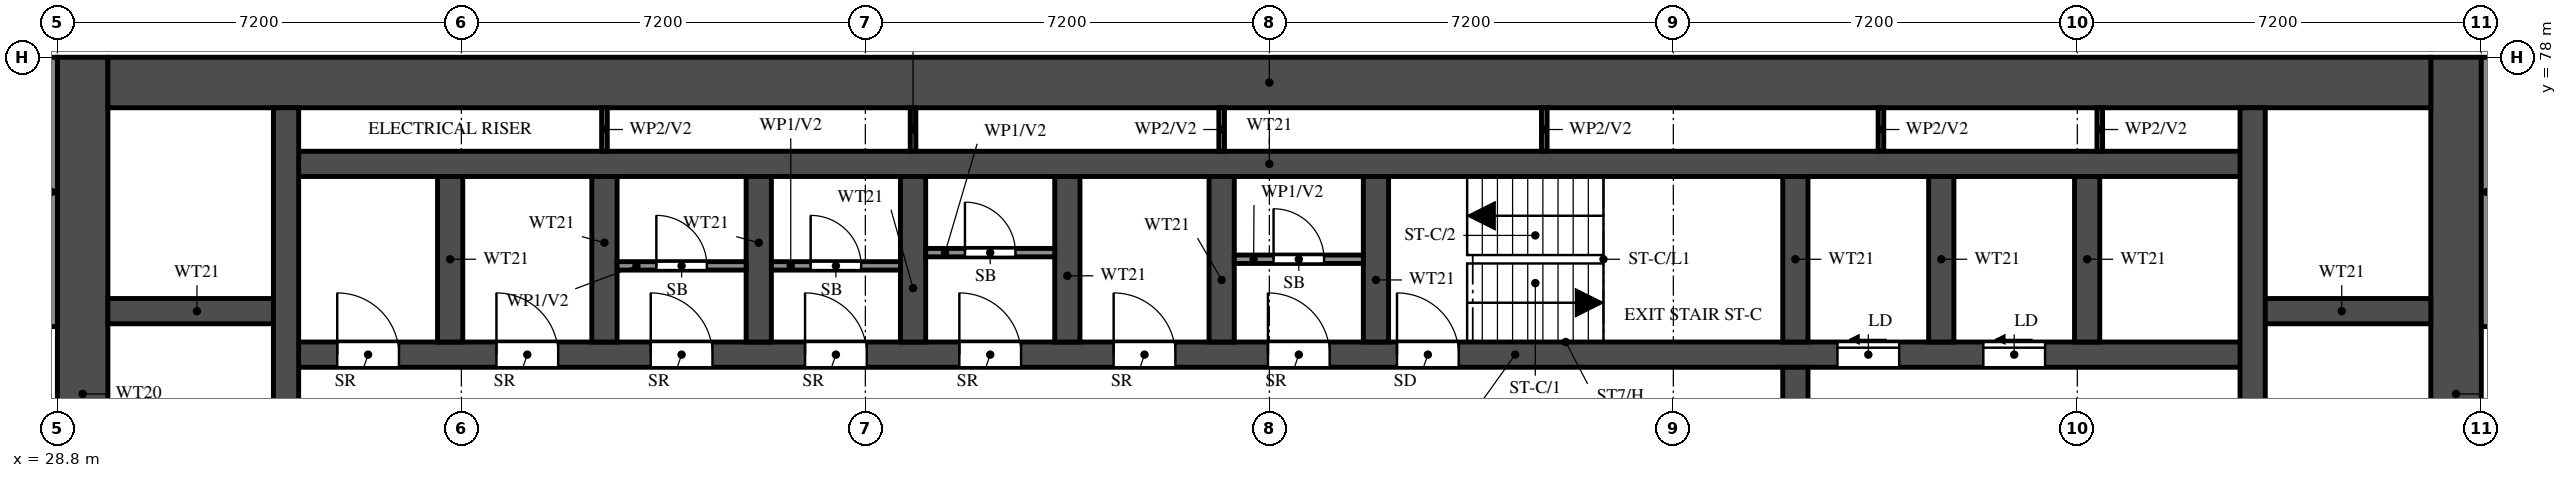
"""IFC4 building model, lengths in metres.
Left out: names, types, materials, properties, quantities, classifications, styles, units other than length and angle.
Written with IfcOpenShell. Run it as: python <this file> out.ifc"""

import sys

from ifc_helpers import new_model, si_unit, direction, frame, frame_2d, origin, place, context, subcontext, project, spatial, rectangle, extrude, element, fill, save


model = new_model("IFC4")
c1 = context("Model", 3, precision=1e-05, world=origin(), true_north=direction((0.0, 1.0)))
c2 = subcontext(c1, "Body", "Model", "MODEL_VIEW")
j1 = project(units=[si_unit("LENGTHUNIT", "METRE"), si_unit("PLANEANGLEUNIT", "RADIAN")], contexts=[c1])
p1 = place(None, origin())
s1 = spatial("IfcSite", under=j1, at=p1, CompositionType="ELEMENT")
p2 = place(p1, origin())
s2 = spatial("IfcBuilding", under=s1, at=p2, CompositionType="ELEMENT")
p3 = place(p2, frame((0.0, 0.0, 65.5)))
s3 = spatial("IfcBuildingStorey", under=s2, at=p3, CompositionType="ELEMENT", Elevation=65.5)
for number, where, z_axis, x_axis in (
    (1, (29.25, 66.0, 0.0), (0.0, 0.0, 1.0), (0.0, 1.0, 0.0)),
    (2, (71.55, 66.0, 0.0), (0.0, 0.0, 1.0), (0.0, 1.0, 0.0)),
):
    element("IfcWall", number, at=place(p3, frame(where, z_axis=z_axis, x_axis=x_axis)), inside=s3, PredefinedType="SHEAR", context=c2, shape_type="SweptSolid", body=[
        extrude(rectangle(XDim=12.0, YDim=0.9, at=frame_2d((6.0, 0.0))), origin(), (0.0, 0.0, 1.0), 3.18),
    ])
p4 = place(p3, frame((29.7, 77.55, 0.0), z_axis=(0.0, 0.0, 1.0), x_axis=(1.0, 0.0, 0.0)))
e3 = element("IfcWall", 3, at=p4, inside=s3, PredefinedType="SHEAR", context=c2, shape_type="SweptSolid", body=[
    extrude(rectangle(XDim=41.4, YDim=0.9, at=frame_2d((20.7, 0.0))), origin(), (0.0, 0.0, 1.0), 3.18),
])
p5 = place(p3, frame((32.875, 72.7, 0.0), z_axis=(0.0, 0.0, 1.0), x_axis=(1.0, 0.0, 0.0)))
e4 = element("IfcWall", 4, at=p5, inside=s3, PredefinedType="SHEAR", context=c2, shape_type="SweptSolid", body=[
    extrude(rectangle(XDim=35.05, YDim=0.45, at=frame_2d((17.525, 0.0))), origin(), (0.0, 0.0, 1.0), 3.18),
])
p6 = place(p5, frame((19.8, 0.0, 0.0)))
e5 = element("IfcOpeningElement", 5, at=p6, cuts=e4, PredefinedType="OPENING", context=c2, shape_type="SweptSolid", body=[
    extrude(rectangle(XDim=1.1, YDim=2.1, at=frame_2d((0.55, 1.05))), frame((0.0, 0.235, 0.0), z_axis=(0.0, -1.0, 0.0), x_axis=(1.0, 0.0, 0.0)), (0.0, 0.0, 1.0), 0.47),
])
p7 = place(p5, frame((27.65, 0.0, 0.0)))
e6 = element("IfcOpeningElement", 6, at=p7, cuts=e4, PredefinedType="OPENING", context=c2, shape_type="SweptSolid", body=[
    extrude(rectangle(XDim=1.1, YDim=2.1, at=frame_2d((0.55, 1.05))), frame((0.0, 0.235, 0.0), z_axis=(0.0, -1.0, 0.0), x_axis=(1.0, 0.0, 0.0)), (0.0, 0.0, 1.0), 0.47),
])
p8 = place(p5, frame((30.25, 0.0, 0.0)))
e7 = element("IfcOpeningElement", 7, at=p8, cuts=e4, PredefinedType="OPENING", context=c2, shape_type="SweptSolid", body=[
    extrude(rectangle(XDim=1.1, YDim=2.1, at=frame_2d((0.55, 1.05))), frame((0.0, 0.235, 0.0), z_axis=(0.0, -1.0, 0.0), x_axis=(1.0, 0.0, 0.0)), (0.0, 0.0, 1.0), 0.47),
])
p9 = place(p5, frame((3.75, 0.0, 0.0)))
e8 = element("IfcOpeningElement", 8, at=p9, cuts=e4, PredefinedType="OPENING", context=c2, shape_type="SweptSolid", body=[
    extrude(rectangle(XDim=1.1, YDim=2.1, at=frame_2d((0.55, 1.05))), frame((0.0, 0.235, 0.0), z_axis=(0.0, -1.0, 0.0), x_axis=(1.0, 0.0, 0.0)), (0.0, 0.0, 1.0), 0.47),
])
p10 = place(p5, frame((6.5, 0.0, 0.0)))
e9 = element("IfcOpeningElement", 9, at=p10, cuts=e4, PredefinedType="OPENING", context=c2, shape_type="SweptSolid", body=[
    extrude(rectangle(XDim=1.1, YDim=2.1, at=frame_2d((0.55, 1.05))), frame((0.0, 0.235, 0.0), z_axis=(0.0, -1.0, 0.0), x_axis=(1.0, 0.0, 0.0)), (0.0, 0.0, 1.0), 0.47),
])
p11 = place(p5, frame((9.25, 0.0, 0.0)))
e10 = element("IfcOpeningElement", 10, at=p11, cuts=e4, PredefinedType="OPENING", context=c2, shape_type="SweptSolid", body=[
    extrude(rectangle(XDim=1.1, YDim=2.1, at=frame_2d((0.55, 1.05))), frame((0.0, 0.235, 0.0), z_axis=(0.0, -1.0, 0.0), x_axis=(1.0, 0.0, 0.0)), (0.0, 0.0, 1.0), 0.47),
])
p12 = place(p5, frame((12.0, 0.0, 0.0)))
e11 = element("IfcOpeningElement", 11, at=p12, cuts=e4, PredefinedType="OPENING", context=c2, shape_type="SweptSolid", body=[
    extrude(rectangle(XDim=1.1, YDim=2.1, at=frame_2d((0.55, 1.05))), frame((0.0, 0.235, 0.0), z_axis=(0.0, -1.0, 0.0), x_axis=(1.0, 0.0, 0.0)), (0.0, 0.0, 1.0), 0.47),
])
p13 = place(p5, frame((14.75, 0.0, 0.0)))
e12 = element("IfcOpeningElement", 12, at=p13, cuts=e4, PredefinedType="OPENING", context=c2, shape_type="SweptSolid", body=[
    extrude(rectangle(XDim=1.1, YDim=2.1, at=frame_2d((0.55, 1.05))), frame((0.0, 0.235, 0.0), z_axis=(0.0, -1.0, 0.0), x_axis=(1.0, 0.0, 0.0)), (0.0, 0.0, 1.0), 0.47),
])
p14 = place(p5, frame((17.5, 0.0, 0.0)))
e13 = element("IfcOpeningElement", 13, at=p14, cuts=e4, PredefinedType="OPENING", context=c2, shape_type="SweptSolid", body=[
    extrude(rectangle(XDim=1.1, YDim=2.1, at=frame_2d((0.55, 1.05))), frame((0.0, 0.235, 0.0), z_axis=(0.0, -1.0, 0.0), x_axis=(1.0, 0.0, 0.0)), (0.0, 0.0, 1.0), 0.47),
])
p15 = place(p5, frame((0.913, 0.0, 0.0)))
e14 = element("IfcOpeningElement", 14, at=p15, cuts=e4, PredefinedType="OPENING", context=c2, shape_type="SweptSolid", body=[
    extrude(rectangle(XDim=1.1, YDim=2.1, at=frame_2d((0.55, 1.05))), frame((0.0, 0.235, 0.0), z_axis=(0.0, -1.0, 0.0), x_axis=(1.0, 0.0, 0.0)), (0.0, 0.0, 1.0), 0.47),
])
p16 = place(p3, frame((32.875, 76.1, 0.0), z_axis=(0.0, 0.0, 1.0), x_axis=(1.0, 0.0, 0.0)))
e15 = element("IfcWall", 15, at=p16, inside=s3, PredefinedType="SHEAR", context=c2, shape_type="SweptSolid", body=[
    extrude(rectangle(XDim=35.05, YDim=0.45, at=frame_2d((17.525, 0.0))), origin(), (0.0, 0.0, 1.0), 3.18),
])
for number, where, z_axis, x_axis in (
    (16, (29.7, 73.475, 0.0), (0.0, 0.0, 1.0), (1.0, 0.0, 0.0)),
    (17, (67.925, 73.475, 0.0), (0.0, 0.0, 1.0), (1.0, 0.0, 0.0)),
):
    element("IfcWall", number, at=place(p3, frame(where, z_axis=z_axis, x_axis=x_axis)), inside=s3, PredefinedType="SHEAR", context=c2, shape_type="SweptSolid", body=[
        extrude(rectangle(XDim=3.175, YDim=0.45, at=frame_2d((1.587, 0.0))), origin(), (0.0, 0.0, 1.0), 3.18),
    ])
p17 = place(p3, frame((32.875, 66.45, 0.0), z_axis=(0.0, 0.0, 1.0), x_axis=(0.0, 1.0, 0.0)))
e18 = element("IfcWall", 18, at=p17, inside=s3, PredefinedType="SHEAR", context=c2, shape_type="SweptSolid", body=[
    extrude(rectangle(XDim=10.65, YDim=0.45, at=frame_2d((5.325, 0.0))), origin(), (0.0, 0.0, 1.0), 3.18),
])
p18 = place(p3, frame((67.925, 66.45, 0.0), z_axis=(0.0, 0.0, 1.0), x_axis=(0.0, 1.0, 0.0)))
e19 = element("IfcWall", 19, at=p18, inside=s3, PredefinedType="SHEAR", context=c2, shape_type="SweptSolid", body=[
    extrude(rectangle(XDim=10.65, YDim=0.45, at=frame_2d((5.325, 0.0))), origin(), (0.0, 0.0, 1.0), 3.18),
])
p19 = place(p18, frame((0.15, 0.0, 0.0)))
e20 = element("IfcOpeningElement", 20, at=p19, cuts=e19, PredefinedType="OPENING", context=c2, shape_type="SweptSolid", body=[
    extrude(rectangle(XDim=1.1, YDim=2.1, at=frame_2d((0.55, 1.05))), frame((0.0, 0.235, 0.0), z_axis=(0.0, -1.0, 0.0), x_axis=(1.0, 0.0, 0.0)), (0.0, 0.0, 1.0), 0.47),
])
p20 = place(p3, frame((59.775, 66.45, 0.0), z_axis=(0.0, 0.0, 1.0), x_axis=(0.0, 1.0, 0.0)))
e21 = element("IfcWall", 21, at=p20, inside=s3, PredefinedType="SHEAR", context=c2, shape_type="SweptSolid", body=[
    extrude(rectangle(XDim=6.025, YDim=0.45, at=frame_2d((3.013, 0.0))), origin(), (0.0, 0.0, 1.0), 3.18),
])
p21 = place(p20, frame((3.85, 0.0, 0.0)))
e22 = element("IfcOpeningElement", 22, at=p21, cuts=e21, PredefinedType="OPENING", context=c2, shape_type="SweptSolid", body=[
    extrude(rectangle(XDim=1.2, YDim=2.1, at=frame_2d((0.6, 1.05))), frame((0.0, 0.235, 0.0), z_axis=(0.0, -1.0, 0.0), x_axis=(1.0, 0.0, 0.0)), (0.0, 0.0, 1.0), 0.47),
])
for number, where, z_axis, x_axis in (
    (23, (59.775, 72.925, 0.0), (0.0, 0.0, 1.0), (0.0, 1.0, 0.0)),
    (24, (35.8, 72.925, 0.0), (0.0, 0.0, 1.0), (0.0, 1.0, 0.0)),
    (25, (38.55, 72.925, 0.0), (0.0, 0.0, 1.0), (0.0, 1.0, 0.0)),
    (26, (41.3, 72.925, 0.0), (0.0, 0.0, 1.0), (0.0, 1.0, 0.0)),
    (27, (44.05, 72.925, 0.0), (0.0, 0.0, 1.0), (0.0, 1.0, 0.0)),
    (28, (46.8, 72.925, 0.0), (0.0, 0.0, 1.0), (0.0, 1.0, 0.0)),
    (29, (49.55, 72.925, 0.0), (0.0, 0.0, 1.0), (0.0, 1.0, 0.0)),
    (30, (52.3, 72.925, 0.0), (0.0, 0.0, 1.0), (0.0, 1.0, 0.0)),
    (31, (62.375, 72.925, 0.0), (0.0, 0.0, 1.0), (0.0, 1.0, 0.0)),
    (32, (64.975, 72.925, 0.0), (0.0, 0.0, 1.0), (0.0, 1.0, 0.0)),
):
    element("IfcWall", number, at=place(p3, frame(where, z_axis=z_axis, x_axis=x_axis)), inside=s3, PredefinedType="SHEAR", context=c2, shape_type="SweptSolid", body=[
        extrude(rectangle(XDim=2.95, YDim=0.45, at=frame_2d((1.475, 0.0))), origin(), (0.0, 0.0, 1.0), 3.18),
    ])
p22 = place(p3, frame((38.775, 74.282, 0.0), z_axis=(0.0, 0.0, 1.0), x_axis=(1.0, 0.0, 0.0)))
e33 = element("IfcWall", 33, at=p22, inside=s3, PredefinedType="PARTITIONING", context=c2, shape_type="SweptSolid", body=[
    extrude(rectangle(XDim=2.3, YDim=0.15, at=frame_2d((1.15, 0.0))), origin(), (0.0, 0.0, 1.0), 3.18),
])
p23 = place(p22, frame((0.7, 0.0, 0.0)))
e34 = element("IfcOpeningElement", 34, at=p23, cuts=e33, PredefinedType="OPENING", context=c2, shape_type="SweptSolid", body=[
    extrude(rectangle(XDim=0.9, YDim=2.1, at=frame_2d((0.45, 1.05))), frame((0.0, 0.085, 0.0), z_axis=(0.0, -1.0, 0.0), x_axis=(1.0, 0.0, 0.0)), (0.0, 0.0, 1.0), 0.17),
])
p24 = place(p3, frame((41.525, 74.282, 0.0), z_axis=(0.0, 0.0, 1.0), x_axis=(1.0, 0.0, 0.0)))
e35 = element("IfcWall", 35, at=p24, inside=s3, PredefinedType="PARTITIONING", context=c2, shape_type="SweptSolid", body=[
    extrude(rectangle(XDim=2.3, YDim=0.15, at=frame_2d((1.15, 0.0))), origin(), (0.0, 0.0, 1.0), 3.18),
])
p25 = place(p24, frame((0.7, 0.0, 0.0)))
e36 = element("IfcOpeningElement", 36, at=p25, cuts=e35, PredefinedType="OPENING", context=c2, shape_type="SweptSolid", body=[
    extrude(rectangle(XDim=0.9, YDim=2.1, at=frame_2d((0.45, 1.05))), frame((0.0, 0.085, 0.0), z_axis=(0.0, -1.0, 0.0), x_axis=(1.0, 0.0, 0.0)), (0.0, 0.0, 1.0), 0.17),
])
p26 = place(p3, frame((44.275, 74.518, 0.0), z_axis=(0.0, 0.0, 1.0), x_axis=(1.0, 0.0, 0.0)))
e37 = element("IfcWall", 37, at=p26, inside=s3, PredefinedType="PARTITIONING", context=c2, shape_type="SweptSolid", body=[
    extrude(rectangle(XDim=2.3, YDim=0.15, at=frame_2d((1.15, 0.0))), origin(), (0.0, 0.0, 1.0), 3.18),
])
p27 = place(p26, frame((0.7, 0.0, 0.0)))
e38 = element("IfcOpeningElement", 38, at=p27, cuts=e37, PredefinedType="OPENING", context=c2, shape_type="SweptSolid", body=[
    extrude(rectangle(XDim=0.9, YDim=2.1, at=frame_2d((0.45, 1.05))), frame((0.0, 0.085, 0.0), z_axis=(0.0, -1.0, 0.0), x_axis=(1.0, 0.0, 0.0)), (0.0, 0.0, 1.0), 0.17),
])
p28 = place(p3, frame((49.775, 74.4, 0.0), z_axis=(0.0, 0.0, 1.0), x_axis=(1.0, 0.0, 0.0)))
e39 = element("IfcWall", 39, at=p28, inside=s3, PredefinedType="PARTITIONING", context=c2, shape_type="SweptSolid", body=[
    extrude(rectangle(XDim=2.3, YDim=0.15, at=frame_2d((1.15, 0.0))), origin(), (0.0, 0.0, 1.0), 3.18),
])
p29 = place(p28, frame((0.7, 0.0, 0.0)))
e40 = element("IfcOpeningElement", 40, at=p29, cuts=e39, PredefinedType="OPENING", context=c2, shape_type="SweptSolid", body=[
    extrude(rectangle(XDim=0.9, YDim=2.1, at=frame_2d((0.45, 1.05))), frame((0.0, 0.085, 0.0), z_axis=(0.0, -1.0, 0.0), x_axis=(1.0, 0.0, 0.0)), (0.0, 0.0, 1.0), 0.17),
])
for number, where, z_axis, x_axis in (
    (41, (38.55, 76.325, 0.0), (0.0, 0.0, 1.0), (0.0, 1.0, 0.0)),
    (42, (44.05, 76.325, 0.0), (0.0, 0.0, 1.0), (0.0, 1.0, 0.0)),
    (43, (49.55, 76.325, 0.0), (0.0, 0.0, 1.0), (0.0, 1.0, 0.0)),
    (44, (55.3, 76.325, 0.0), (0.0, 0.0, 1.0), (0.0, 1.0, 0.0)),
    (45, (61.3, 76.325, 0.0), (0.0, 0.0, 1.0), (0.0, 1.0, 0.0)),
    (46, (65.2, 76.325, 0.0), (0.0, 0.0, 1.0), (0.0, 1.0, 0.0)),
):
    element("IfcWall", number, at=place(p3, frame(where, z_axis=z_axis, x_axis=x_axis)), inside=s3, PredefinedType="PARTITIONING", context=c2, shape_type="SweptSolid", body=[
        extrude(rectangle(XDim=0.775, YDim=0.1, at=frame_2d((0.388, 0.0))), origin(), (0.0, 0.0, 1.0), 3.18),
    ])
for number, where, z_axis, x_axis in (
    (47, (28.7, 73.2, 0.0), (0.0, 0.0, 1.0), (0.0, 1.0, 0.0)),
    (48, (72.1, 73.2, 0.0), (0.0, 0.0, 1.0), (0.0, 1.0, 0.0)),
):
    element("IfcWall", number, at=place(p3, frame(where, z_axis=z_axis, x_axis=x_axis)), inside=s3, PredefinedType="SOLIDWALL", context=c2, shape_type="SweptSolid", body=[
        extrude(rectangle(XDim=4.8, YDim=0.2, at=frame_2d((2.4, 0.0))), origin(), (0.0, 0.0, 1.0), 3.18),
    ])
p30 = place(p6, origin())
e49 = element("IfcDoor", 49, at=p30, inside=s3, OperationType="SINGLE_SWING_LEFT", PredefinedType="DOOR", context=c2, shape_type="SweptSolid", body=[
    extrude(rectangle(XDim=1.1, YDim=2.1, at=frame_2d((0.55, 1.05))), frame((0.0, 0.025, 0.0), z_axis=(0.0, -1.0, 0.0), x_axis=(1.0, 0.0, 0.0)), (0.0, 0.0, 1.0), 0.05),
])
fill(e5, e49)
p31 = place(p7, origin())
e50 = element("IfcDoor", 50, at=p31, inside=s3, OperationType="SLIDING_TO_LEFT", PredefinedType="DOOR", context=c2, shape_type="SweptSolid", body=[
    extrude(rectangle(XDim=1.1, YDim=2.1, at=frame_2d((0.55, 1.05))), frame((0.0, 0.025, 0.0), z_axis=(0.0, -1.0, 0.0), x_axis=(1.0, 0.0, 0.0)), (0.0, 0.0, 1.0), 0.05),
])
fill(e6, e50)
p32 = place(p8, origin())
e51 = element("IfcDoor", 51, at=p32, inside=s3, OperationType="SLIDING_TO_LEFT", PredefinedType="DOOR", context=c2, shape_type="SweptSolid", body=[
    extrude(rectangle(XDim=1.1, YDim=2.1, at=frame_2d((0.55, 1.05))), frame((0.0, 0.025, 0.0), z_axis=(0.0, -1.0, 0.0), x_axis=(1.0, 0.0, 0.0)), (0.0, 0.0, 1.0), 0.05),
])
fill(e7, e51)
p33 = place(p9, origin())
e52 = element("IfcDoor", 52, at=p33, inside=s3, OperationType="SINGLE_SWING_LEFT", PredefinedType="DOOR", context=c2, shape_type="SweptSolid", body=[
    extrude(rectangle(XDim=1.1, YDim=2.1, at=frame_2d((0.55, 1.05))), frame((0.0, 0.025, 0.0), z_axis=(0.0, -1.0, 0.0), x_axis=(1.0, 0.0, 0.0)), (0.0, 0.0, 1.0), 0.05),
])
fill(e8, e52)
p34 = place(p10, origin())
e53 = element("IfcDoor", 53, at=p34, inside=s3, OperationType="SINGLE_SWING_LEFT", PredefinedType="DOOR", context=c2, shape_type="SweptSolid", body=[
    extrude(rectangle(XDim=1.1, YDim=2.1, at=frame_2d((0.55, 1.05))), frame((0.0, 0.025, 0.0), z_axis=(0.0, -1.0, 0.0), x_axis=(1.0, 0.0, 0.0)), (0.0, 0.0, 1.0), 0.05),
])
fill(e9, e53)
p35 = place(p23, origin())
e54 = element("IfcDoor", 54, at=p35, inside=s3, OperationType="SINGLE_SWING_RIGHT", PredefinedType="DOOR", context=c2, shape_type="SweptSolid", body=[
    extrude(rectangle(XDim=0.9, YDim=2.1, at=frame_2d((0.45, 1.05))), frame((0.0, 0.025, 0.0), z_axis=(0.0, -1.0, 0.0), x_axis=(1.0, 0.0, 0.0)), (0.0, 0.0, 1.0), 0.05),
])
fill(e34, e54)
p36 = place(p11, origin())
e55 = element("IfcDoor", 55, at=p36, inside=s3, OperationType="SINGLE_SWING_LEFT", PredefinedType="DOOR", context=c2, shape_type="SweptSolid", body=[
    extrude(rectangle(XDim=1.1, YDim=2.1, at=frame_2d((0.55, 1.05))), frame((0.0, 0.025, 0.0), z_axis=(0.0, -1.0, 0.0), x_axis=(1.0, 0.0, 0.0)), (0.0, 0.0, 1.0), 0.05),
])
fill(e10, e55)
p37 = place(p25, origin())
e56 = element("IfcDoor", 56, at=p37, inside=s3, OperationType="SINGLE_SWING_LEFT", PredefinedType="DOOR", context=c2, shape_type="SweptSolid", body=[
    extrude(rectangle(XDim=0.9, YDim=2.1, at=frame_2d((0.45, 1.05))), frame((0.0, 0.025, 0.0), z_axis=(0.0, -1.0, 0.0), x_axis=(1.0, 0.0, 0.0)), (0.0, 0.0, 1.0), 0.05),
])
fill(e36, e56)
p38 = place(p12, origin())
e57 = element("IfcDoor", 57, at=p38, inside=s3, OperationType="SINGLE_SWING_LEFT", PredefinedType="DOOR", context=c2, shape_type="SweptSolid", body=[
    extrude(rectangle(XDim=1.1, YDim=2.1, at=frame_2d((0.55, 1.05))), frame((0.0, 0.025, 0.0), z_axis=(0.0, -1.0, 0.0), x_axis=(1.0, 0.0, 0.0)), (0.0, 0.0, 1.0), 0.05),
])
fill(e11, e57)
p39 = place(p27, origin())
e58 = element("IfcDoor", 58, at=p39, inside=s3, OperationType="SINGLE_SWING_LEFT", PredefinedType="DOOR", context=c2, shape_type="SweptSolid", body=[
    extrude(rectangle(XDim=0.9, YDim=2.1, at=frame_2d((0.45, 1.05))), frame((0.0, 0.025, 0.0), z_axis=(0.0, -1.0, 0.0), x_axis=(1.0, 0.0, 0.0)), (0.0, 0.0, 1.0), 0.05),
])
fill(e38, e58)
p40 = place(p13, origin())
e59 = element("IfcDoor", 59, at=p40, inside=s3, OperationType="SINGLE_SWING_LEFT", PredefinedType="DOOR", context=c2, shape_type="SweptSolid", body=[
    extrude(rectangle(XDim=1.1, YDim=2.1, at=frame_2d((0.55, 1.05))), frame((0.0, 0.025, 0.0), z_axis=(0.0, -1.0, 0.0), x_axis=(1.0, 0.0, 0.0)), (0.0, 0.0, 1.0), 0.05),
])
fill(e12, e59)
p41 = place(p14, origin())
e60 = element("IfcDoor", 60, at=p41, inside=s3, OperationType="SINGLE_SWING_LEFT", PredefinedType="DOOR", context=c2, shape_type="SweptSolid", body=[
    extrude(rectangle(XDim=1.1, YDim=2.1, at=frame_2d((0.55, 1.05))), frame((0.0, 0.025, 0.0), z_axis=(0.0, -1.0, 0.0), x_axis=(1.0, 0.0, 0.0)), (0.0, 0.0, 1.0), 0.05),
])
fill(e13, e60)
p42 = place(p29, origin())
e61 = element("IfcDoor", 61, at=p42, inside=s3, OperationType="SINGLE_SWING_RIGHT", PredefinedType="DOOR", context=c2, shape_type="SweptSolid", body=[
    extrude(rectangle(XDim=0.9, YDim=2.1, at=frame_2d((0.45, 1.05))), frame((0.0, 0.025, 0.0), z_axis=(0.0, -1.0, 0.0), x_axis=(1.0, 0.0, 0.0)), (0.0, 0.0, 1.0), 0.05),
])
fill(e40, e61)
p43 = place(p15, origin())
e62 = element("IfcDoor", 62, at=p43, inside=s3, OperationType="SINGLE_SWING_LEFT", PredefinedType="DOOR", context=c2, shape_type="SweptSolid", body=[
    extrude(rectangle(XDim=1.1, YDim=2.1, at=frame_2d((0.55, 1.05))), frame((0.0, 0.025, 0.0), z_axis=(0.0, -1.0, 0.0), x_axis=(1.0, 0.0, 0.0)), (0.0, 0.0, 1.0), 0.05),
])
fill(e14, e62)
save(model, sys.argv[1])
